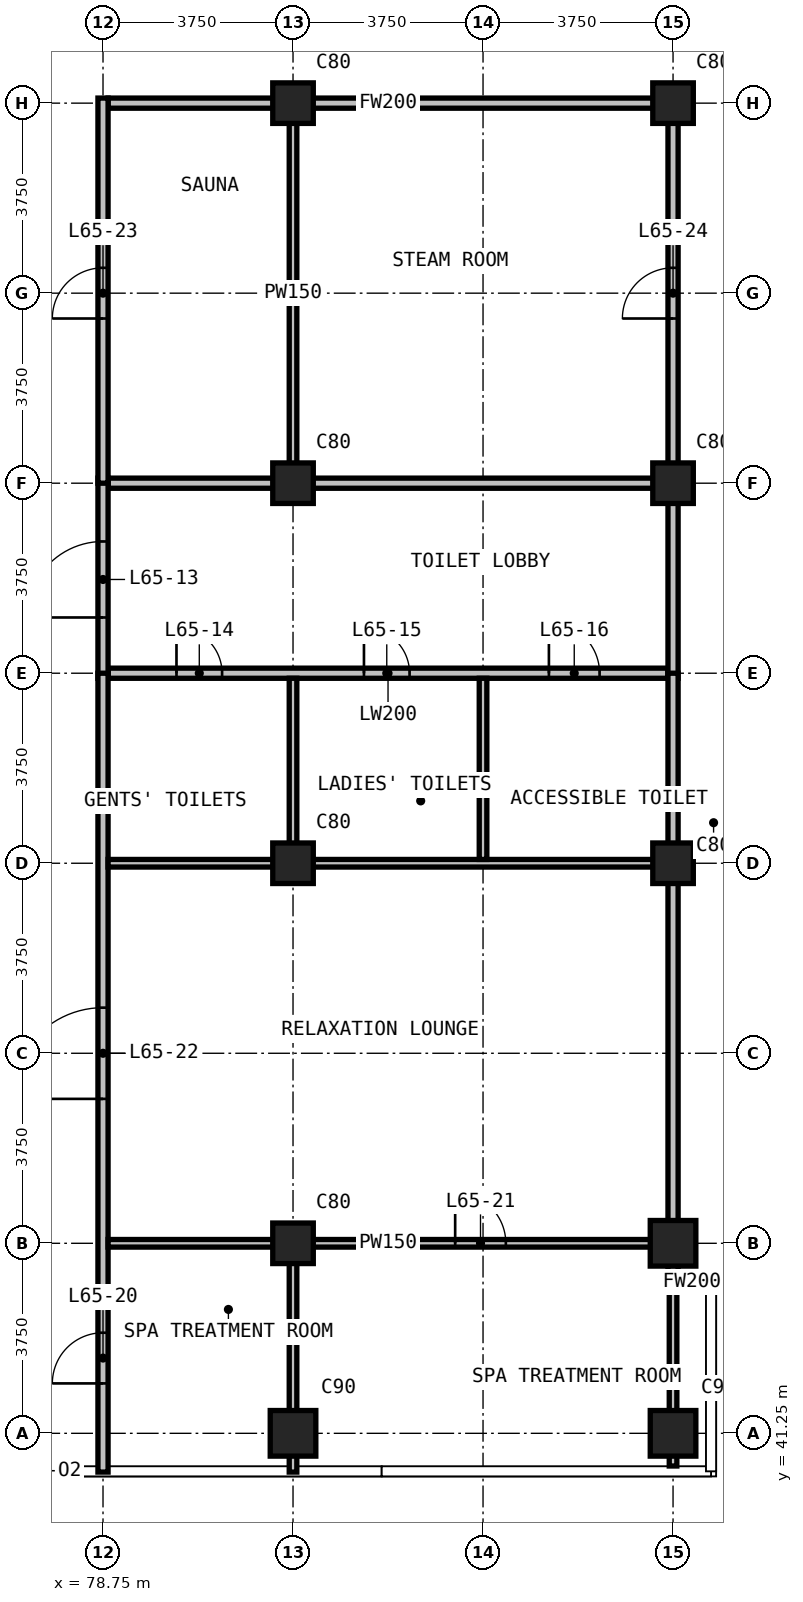
"""IFC4 building model, lengths in metres.
Left out: names, types, materials, properties, quantities, classifications, styles, units other than length and angle.
Written with IfcOpenShell. Run it as: python <this file> out.ifc"""

import sys

from ifc_helpers import new_model, si_unit, direction, frame, frame_2d, origin, origin_2d, place, context, subcontext, project, spatial, rectangle, extrude, element, fill, save


model = new_model("IFC4")
c1 = context("Model", 3, precision=1e-05, world=origin(), true_north=direction((0.0, 1.0)))
c2 = subcontext(c1, "Body", "Model", "MODEL_VIEW")
j1 = project(units=[si_unit("LENGTHUNIT", "METRE"), si_unit("PLANEANGLEUNIT", "RADIAN")], contexts=[c1])
p1 = place(None, origin())
s1 = spatial("IfcSite", under=j1, at=p1, CompositionType="ELEMENT")
p2 = place(p1, origin())
s2 = spatial("IfcBuilding", under=s1, at=p2, CompositionType="ELEMENT")
p3 = place(p2, frame((0.0, 0.0, 249.9)))
s3 = spatial("IfcBuildingStorey", under=s2, at=p3, CompositionType="ELEMENT", Elevation=249.9)
p4 = place(p3, frame((82.5, 41.25, 0.0), z_axis=(0.0, 0.0, 1.0), x_axis=(1.0, 0.0, 0.0)))
e1 = element("IfcColumn", 1, at=p4, inside=s3, PredefinedType="COLUMN", context=c2, shape_type="SweptSolid", body=[
    extrude(rectangle(XDim=0.9, YDim=0.9, at=origin_2d()), origin(), (0.0, 0.0, 1.0), 3.6),
])
for number, where, z_axis, x_axis in (
    (2, (82.5, 45.0, 0.0), (0.0, 0.0, 1.0), (1.0, 0.0, 0.0)),
    (3, (82.5, 52.5, 0.0), (0.0, 0.0, 1.0), (1.0, 0.0, 0.0)),
    (4, (82.5, 60.0, 0.0), (0.0, 0.0, 1.0), (1.0, 0.0, 0.0)),
    (5, (82.5, 67.5, 0.0), (0.0, 0.0, 1.0), (1.0, 0.0, 0.0)),
):
    element("IfcColumn", number, at=place(p3, frame(where, z_axis=z_axis, x_axis=x_axis)), inside=s3, PredefinedType="COLUMN", context=c2, shape_type="SweptSolid", body=[
        extrude(rectangle(XDim=0.8, YDim=0.8, at=origin_2d()), origin(), (0.0, 0.0, 1.0), 3.6),
    ])
for number, where, z_axis, x_axis in (
    (6, (90.0, 41.25, 0.0), (0.0, 0.0, 1.0), (1.0, 0.0, 0.0)),
    (7, (90.0, 45.0, 0.0), (0.0, 0.0, 1.0), (1.0, 0.0, 0.0)),
):
    element("IfcColumn", number, at=place(p3, frame(where, z_axis=z_axis, x_axis=x_axis)), inside=s3, PredefinedType="COLUMN", context=c2, shape_type="SweptSolid", body=[
        extrude(rectangle(XDim=0.9, YDim=0.9, at=origin_2d()), origin(), (0.0, 0.0, 1.0), 3.6),
    ])
for number, where, z_axis, x_axis in (
    (8, (90.0, 52.5, 0.0), (0.0, 0.0, 1.0), (1.0, 0.0, 0.0)),
    (9, (90.0, 60.0, 0.0), (0.0, 0.0, 1.0), (1.0, 0.0, 0.0)),
    (10, (90.0, 67.5, 0.0), (0.0, 0.0, 1.0), (1.0, 0.0, 0.0)),
):
    element("IfcColumn", number, at=place(p3, frame(where, z_axis=z_axis, x_axis=x_axis)), inside=s3, PredefinedType="COLUMN", context=c2, shape_type="SweptSolid", body=[
        extrude(rectangle(XDim=0.8, YDim=0.8, at=origin_2d()), origin(), (0.0, 0.0, 1.0), 3.6),
    ])
p5 = place(p3, frame((78.85, 56.25, 0.0), z_axis=(0.0, 0.0, 1.0), x_axis=(1.0, 0.0, 0.0)))
e11 = element("IfcWall", 11, at=p5, inside=s3, PredefinedType="PARTITIONING", context=c2, shape_type="SweptSolid", body=[
    extrude(rectangle(XDim=11.05, YDim=0.2, at=frame_2d((5.525, 0.0))), origin(), (0.0, 0.0, 1.0), 3.25),
])
p6 = place(p5, frame((1.35, 0.0, 0.0)))
e12 = element("IfcOpeningElement", 12, at=p6, cuts=e11, PredefinedType="OPENING", context=c2, shape_type="SweptSolid", body=[
    extrude(rectangle(XDim=0.9, YDim=2.2, at=frame_2d((0.45, 1.1))), frame((0.0, 0.11, 0.0), z_axis=(0.0, -1.0, 0.0), x_axis=(1.0, 0.0, 0.0)), (0.0, 0.0, 1.0), 0.22),
])
p7 = place(p5, frame((5.05, 0.0, 0.0)))
e13 = element("IfcOpeningElement", 13, at=p7, cuts=e11, PredefinedType="OPENING", context=c2, shape_type="SweptSolid", body=[
    extrude(rectangle(XDim=0.9, YDim=2.2, at=frame_2d((0.45, 1.1))), frame((0.0, 0.11, 0.0), z_axis=(0.0, -1.0, 0.0), x_axis=(1.0, 0.0, 0.0)), (0.0, 0.0, 1.0), 0.22),
])
p8 = place(p5, frame((8.7, 0.0, 0.0)))
e14 = element("IfcOpeningElement", 14, at=p8, cuts=e11, PredefinedType="OPENING", context=c2, shape_type="SweptSolid", body=[
    extrude(rectangle(XDim=1.0, YDim=2.2, at=frame_2d((0.5, 1.1))), frame((0.0, 0.11, 0.0), z_axis=(0.0, -1.0, 0.0), x_axis=(1.0, 0.0, 0.0)), (0.0, 0.0, 1.0), 0.22),
])
p9 = place(p3, frame((78.85, 60.0, 0.0), z_axis=(0.0, 0.0, 1.0), x_axis=(1.0, 0.0, 0.0)))
e15 = element("IfcWall", 15, at=p9, inside=s3, PredefinedType="PARTITIONING", context=c2, shape_type="SweptSolid", body=[
    extrude(rectangle(XDim=11.05, YDim=0.2, at=frame_2d((5.525, 0.0))), origin(), (0.0, 0.0, 1.0), 3.25),
])
p10 = place(p3, frame((78.75, 56.15, 0.0), z_axis=(0.0, 0.0, 1.0), x_axis=(0.0, 1.0, 0.0)))
e16 = element("IfcWall", 16, at=p10, inside=s3, PredefinedType="PARTITIONING", context=c2, shape_type="SweptSolid", body=[
    extrude(rectangle(XDim=3.95, YDim=0.2, at=frame_2d((1.975, 0.0))), origin(), (0.0, 0.0, 1.0), 3.25),
])
p11 = place(p10, frame((1.2, 0.0, 0.0)))
e17 = element("IfcOpeningElement", 17, at=p11, cuts=e16, PredefinedType="OPENING", context=c2, shape_type="SweptSolid", body=[
    extrude(rectangle(XDim=1.5, YDim=2.2, at=frame_2d((0.75, 1.1))), frame((0.0, 0.11, 0.0), z_axis=(0.0, -1.0, 0.0), x_axis=(1.0, 0.0, 0.0)), (0.0, 0.0, 1.0), 0.22),
])
p12 = place(p3, frame((90.0, 56.15, 0.0), z_axis=(0.0, 0.0, 1.0), x_axis=(0.0, 1.0, 0.0)))
e18 = element("IfcWall", 18, at=p12, inside=s3, PredefinedType="PARTITIONING", context=c2, shape_type="SweptSolid", body=[
    extrude(rectangle(XDim=3.95, YDim=0.2, at=frame_2d((1.975, 0.0))), origin(), (0.0, 0.0, 1.0), 3.25),
])
p13 = place(p3, frame((90.1, 44.235, 0.0), z_axis=(0.0, 0.0, 1.0), x_axis=(1.0, 0.0, 0.0)))
e19 = element("IfcWall", 19, at=p13, inside=s3, PredefinedType="PARTITIONING", context=c2, shape_type="SweptSolid", body=[
    extrude(rectangle(XDim=0.545, YDim=0.2, at=frame_2d((0.272, 0.0))), origin(), (0.0, 0.0, 1.0), 3.25),
])
p14 = place(p3, frame((78.85, 67.5, 0.0), z_axis=(0.0, 0.0, 1.0), x_axis=(1.0, 0.0, 0.0)))
e20 = element("IfcWall", 20, at=p14, inside=s3, PredefinedType="PARTITIONING", context=c2, shape_type="SweptSolid", body=[
    extrude(rectangle(XDim=11.05, YDim=0.2, at=frame_2d((5.525, 0.0))), origin(), (0.0, 0.0, 1.0), 3.25),
])
p15 = place(p3, frame((78.75, 40.485, 0.0), z_axis=(0.0, 0.0, 1.0), x_axis=(0.0, 1.0, 0.0)))
e21 = element("IfcWall", 21, at=p15, inside=s3, PredefinedType="PARTITIONING", context=c2, shape_type="SweptSolid", body=[
    extrude(rectangle(XDim=15.765, YDim=0.2, at=frame_2d((7.882, 0.0))), origin(), (0.0, 0.0, 1.0), 3.25),
])
p16 = place(p15, frame((1.75, 0.0, 0.0)))
e22 = element("IfcOpeningElement", 22, at=p16, cuts=e21, PredefinedType="OPENING", context=c2, shape_type="SweptSolid", body=[
    extrude(rectangle(XDim=1.0, YDim=2.2, at=frame_2d((0.5, 1.1))), frame((0.0, 0.11, 0.0), z_axis=(0.0, -1.0, 0.0), x_axis=(1.0, 0.0, 0.0)), (0.0, 0.0, 1.0), 0.22),
])
p17 = place(p15, frame((7.365, 0.0, 0.0)))
e23 = element("IfcOpeningElement", 23, at=p17, cuts=e21, PredefinedType="OPENING", context=c2, shape_type="SweptSolid", body=[
    extrude(rectangle(XDim=1.8, YDim=2.2, at=frame_2d((0.9, 1.1))), frame((0.0, 0.11, 0.0), z_axis=(0.0, -1.0, 0.0), x_axis=(1.0, 0.0, 0.0)), (0.0, 0.0, 1.0), 0.22),
])
p18 = place(p3, frame((78.75, 60.0, 0.0), z_axis=(0.0, 0.0, 1.0), x_axis=(0.0, 1.0, 0.0)))
e24 = element("IfcWall", 24, at=p18, inside=s3, PredefinedType="PARTITIONING", context=c2, shape_type="SweptSolid", body=[
    extrude(rectangle(XDim=7.6, YDim=0.2, at=frame_2d((3.8, 0.0))), origin(), (0.0, 0.0, 1.0), 3.25),
])
p19 = place(p18, frame((3.25, 0.0, 0.0)))
e25 = element("IfcOpeningElement", 25, at=p19, cuts=e24, PredefinedType="OPENING", context=c2, shape_type="SweptSolid", body=[
    extrude(rectangle(XDim=1.0, YDim=2.2, at=frame_2d((0.5, 1.1))), frame((0.0, 0.11, 0.0), z_axis=(0.0, -1.0, 0.0), x_axis=(1.0, 0.0, 0.0)), (0.0, 0.0, 1.0), 0.22),
])
p20 = place(p3, frame((90.0, 44.135, 0.0), z_axis=(0.0, 0.0, 1.0), x_axis=(0.0, 1.0, 0.0)))
e26 = element("IfcWall", 26, at=p20, inside=s3, PredefinedType="PARTITIONING", context=c2, shape_type="SweptSolid", body=[
    extrude(rectangle(XDim=12.115, YDim=0.2, at=frame_2d((6.058, 0.0))), origin(), (0.0, 0.0, 1.0), 3.25),
])
p21 = place(p3, frame((90.0, 60.0, 0.0), z_axis=(0.0, 0.0, 1.0), x_axis=(0.0, 1.0, 0.0)))
e27 = element("IfcWall", 27, at=p21, inside=s3, PredefinedType="PARTITIONING", context=c2, shape_type="SweptSolid", body=[
    extrude(rectangle(XDim=7.6, YDim=0.2, at=frame_2d((3.8, 0.0))), origin(), (0.0, 0.0, 1.0), 3.25),
])
p22 = place(p21, frame((3.25, 0.0, 0.0)))
e28 = element("IfcOpeningElement", 28, at=p22, cuts=e27, PredefinedType="OPENING", context=c2, shape_type="SweptSolid", body=[
    extrude(rectangle(XDim=1.0, YDim=2.2, at=frame_2d((0.5, 1.1))), frame((0.0, 0.11, 0.0), z_axis=(0.0, -1.0, 0.0), x_axis=(1.0, 0.0, 0.0)), (0.0, 0.0, 1.0), 0.22),
])
p23 = place(p3, frame((78.85, 45.0, 0.0), z_axis=(0.0, 0.0, 1.0), x_axis=(1.0, 0.0, 0.0)))
e29 = element("IfcWall", 29, at=p23, inside=s3, PredefinedType="PARTITIONING", context=c2, shape_type="SweptSolid", body=[
    extrude(rectangle(XDim=11.05, YDim=0.15, at=frame_2d((5.525, 0.0))), origin(), (0.0, 0.0, 1.0), 3.25),
])
p24 = place(p23, frame((6.85, 0.0, 0.0)))
e30 = element("IfcOpeningElement", 30, at=p24, cuts=e29, PredefinedType="OPENING", context=c2, shape_type="SweptSolid", body=[
    extrude(rectangle(XDim=1.0, YDim=2.2, at=frame_2d((0.5, 1.1))), frame((0.0, 0.085, 0.0), z_axis=(0.0, -1.0, 0.0), x_axis=(1.0, 0.0, 0.0)), (0.0, 0.0, 1.0), 0.17),
])
p25 = place(p3, frame((78.85, 52.5, 0.0), z_axis=(0.0, 0.0, 1.0), x_axis=(1.0, 0.0, 0.0)))
e31 = element("IfcWall", 31, at=p25, inside=s3, PredefinedType="PARTITIONING", context=c2, shape_type="SweptSolid", body=[
    extrude(rectangle(XDim=11.05, YDim=0.15, at=frame_2d((5.525, 0.0))), origin(), (0.0, 0.0, 1.0), 3.25),
])
p26 = place(p3, frame((82.5, 40.485, 0.0), z_axis=(0.0, 0.0, 1.0), x_axis=(0.0, 1.0, 0.0)))
e32 = element("IfcWall", 32, at=p26, inside=s3, PredefinedType="PARTITIONING", context=c2, shape_type="SweptSolid", body=[
    extrude(rectangle(XDim=4.44, YDim=0.15, at=frame_2d((2.22, 0.0))), origin(), (0.0, 0.0, 1.0), 3.25),
])
p27 = place(p3, frame((82.5, 52.575, 0.0), z_axis=(0.0, 0.0, 1.0), x_axis=(0.0, 1.0, 0.0)))
e33 = element("IfcWall", 33, at=p27, inside=s3, PredefinedType="PARTITIONING", context=c2, shape_type="SweptSolid", body=[
    extrude(rectangle(XDim=3.575, YDim=0.15, at=frame_2d((1.788, 0.0))), origin(), (0.0, 0.0, 1.0), 3.25),
])
p28 = place(p3, frame((82.5, 60.1, 0.0), z_axis=(0.0, 0.0, 1.0), x_axis=(0.0, 1.0, 0.0)))
e34 = element("IfcWall", 34, at=p28, inside=s3, PredefinedType="PARTITIONING", context=c2, shape_type="SweptSolid", body=[
    extrude(rectangle(XDim=7.3, YDim=0.15, at=frame_2d((3.65, 0.0))), origin(), (0.0, 0.0, 1.0), 3.25),
])
p29 = place(p3, frame((86.25, 52.575, 0.0), z_axis=(0.0, 0.0, 1.0), x_axis=(0.0, 1.0, 0.0)))
e35 = element("IfcWall", 35, at=p29, inside=s3, PredefinedType="PARTITIONING", context=c2, shape_type="SweptSolid", body=[
    extrude(rectangle(XDim=3.575, YDim=0.15, at=frame_2d((1.788, 0.0))), origin(), (0.0, 0.0, 1.0), 3.25),
])
p30 = place(p3, frame((90.0, 40.605, 0.0), z_axis=(0.0, 0.0, 1.0), x_axis=(0.0, 1.0, 0.0)))
e36 = element("IfcWall", 36, at=p30, inside=s3, PredefinedType="PARTITIONING", context=c2, shape_type="SweptSolid", body=[
    extrude(rectangle(XDim=3.6, YDim=0.15, at=frame_2d((1.8, 0.0))), origin(), (0.0, 0.0, 1.0), 3.25),
])
p31 = place(p11, origin())
e37 = element("IfcDoor", 37, at=p31, inside=s3, OperationType="DOUBLE_DOOR_SINGLE_SWING", PredefinedType="DOOR", context=c2, shape_type="SweptSolid", body=[
    extrude(rectangle(XDim=1.5, YDim=2.2, at=frame_2d((0.75, 1.1))), frame((0.0, 0.025, 0.0), z_axis=(0.0, -1.0, 0.0), x_axis=(1.0, 0.0, 0.0)), (0.0, 0.0, 1.0), 0.05),
])
fill(e17, e37)
p32 = place(p6, origin())
e38 = element("IfcDoor", 38, at=p32, inside=s3, OperationType="SINGLE_SWING_RIGHT", PredefinedType="DOOR", context=c2, shape_type="SweptSolid", body=[
    extrude(rectangle(XDim=0.9, YDim=2.2, at=frame_2d((0.45, 1.1))), frame((0.0, 0.025, 0.0), z_axis=(0.0, -1.0, 0.0), x_axis=(1.0, 0.0, 0.0)), (0.0, 0.0, 1.0), 0.05),
])
fill(e12, e38)
p33 = place(p7, origin())
e39 = element("IfcDoor", 39, at=p33, inside=s3, OperationType="SINGLE_SWING_RIGHT", PredefinedType="DOOR", context=c2, shape_type="SweptSolid", body=[
    extrude(rectangle(XDim=0.9, YDim=2.2, at=frame_2d((0.45, 1.1))), frame((0.0, 0.025, 0.0), z_axis=(0.0, -1.0, 0.0), x_axis=(1.0, 0.0, 0.0)), (0.0, 0.0, 1.0), 0.05),
])
fill(e13, e39)
p34 = place(p8, origin())
e40 = element("IfcDoor", 40, at=p34, inside=s3, OperationType="SINGLE_SWING_LEFT", PredefinedType="DOOR", context=c2, shape_type="SweptSolid", body=[
    extrude(rectangle(XDim=1.0, YDim=2.2, at=frame_2d((0.5, 1.1))), frame((0.0, 0.025, 0.0), z_axis=(0.0, -1.0, 0.0), x_axis=(1.0, 0.0, 0.0)), (0.0, 0.0, 1.0), 0.05),
])
fill(e14, e40)
p35 = place(p16, origin())
e41 = element("IfcDoor", 41, at=p35, inside=s3, OperationType="SINGLE_SWING_LEFT", PredefinedType="DOOR", context=c2, shape_type="SweptSolid", body=[
    extrude(rectangle(XDim=1.0, YDim=2.2, at=frame_2d((0.5, 1.1))), frame((0.0, 0.025, 0.0), z_axis=(0.0, -1.0, 0.0), x_axis=(1.0, 0.0, 0.0)), (0.0, 0.0, 1.0), 0.05),
])
fill(e22, e41)
p36 = place(p24, origin())
e42 = element("IfcDoor", 42, at=p36, inside=s3, OperationType="SINGLE_SWING_LEFT", PredefinedType="DOOR", context=c2, shape_type="SweptSolid", body=[
    extrude(rectangle(XDim=1.0, YDim=2.2, at=frame_2d((0.5, 1.1))), frame((0.0, 0.025, 0.0), z_axis=(0.0, -1.0, 0.0), x_axis=(1.0, 0.0, 0.0)), (0.0, 0.0, 1.0), 0.05),
])
fill(e30, e42)
p37 = place(p17, origin())
e43 = element("IfcDoor", 43, at=p37, inside=s3, OperationType="DOUBLE_DOOR_SINGLE_SWING", PredefinedType="DOOR", context=c2, shape_type="SweptSolid", body=[
    extrude(rectangle(XDim=1.8, YDim=2.2, at=frame_2d((0.9, 1.1))), frame((0.0, 0.025, 0.0), z_axis=(0.0, -1.0, 0.0), x_axis=(1.0, 0.0, 0.0)), (0.0, 0.0, 1.0), 0.05),
])
fill(e23, e43)
p38 = place(p19, origin())
e44 = element("IfcDoor", 44, at=p38, inside=s3, OperationType="SINGLE_SWING_LEFT", PredefinedType="DOOR", context=c2, shape_type="SweptSolid", body=[
    extrude(rectangle(XDim=1.0, YDim=2.2, at=frame_2d((0.5, 1.1))), frame((0.0, 0.025, 0.0), z_axis=(0.0, -1.0, 0.0), x_axis=(1.0, 0.0, 0.0)), (0.0, 0.0, 1.0), 0.05),
])
fill(e25, e44)
p39 = place(p22, origin())
e45 = element("IfcDoor", 45, at=p39, inside=s3, OperationType="SINGLE_SWING_LEFT", PredefinedType="DOOR", context=c2, shape_type="SweptSolid", body=[
    extrude(rectangle(XDim=1.0, YDim=2.2, at=frame_2d((0.5, 1.1))), frame((0.0, 0.025, 0.0), z_axis=(0.0, -1.0, 0.0), x_axis=(1.0, 0.0, 0.0)), (0.0, 0.0, 1.0), 0.05),
])
fill(e28, e45)
save(model, sys.argv[1])
